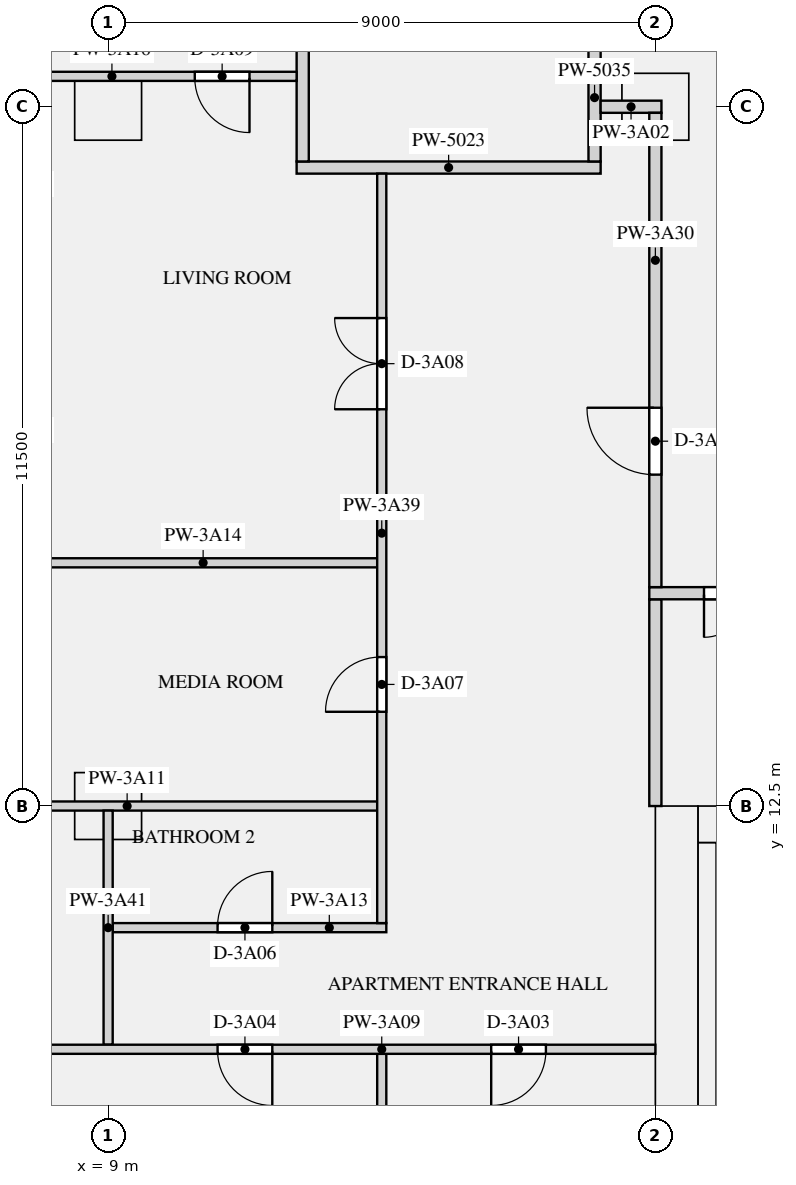
"""IFC4 building model, lengths in metres.
Left out: names, types, materials, properties, quantities, classifications, styles, units other than length and angle.
Written with IfcOpenShell. Run it as: python <this file> out.ifc"""

import sys

from ifc_helpers import new_model, si_unit, direction, frame, frame_2d, origin, origin_2d, place, context, subcontext, project, spatial, rectangle, extrude, element, fill, save


model = new_model("IFC4")
c1 = context("Model", 3, precision=1e-05, world=origin(), true_north=direction((0.0, 1.0)))
c2 = subcontext(c1, "Body", "Model", "MODEL_VIEW")
j1 = project(units=[si_unit("LENGTHUNIT", "METRE"), si_unit("PLANEANGLEUNIT", "RADIAN")], contexts=[c1])
p1 = place(None, origin())
s1 = spatial("IfcSite", under=j1, at=p1, CompositionType="ELEMENT")
p2 = place(p1, origin())
s2 = spatial("IfcBuilding", under=s1, at=p2, CompositionType="ELEMENT")
p3 = place(p2, frame((0.0, 0.0, 144.45)))
s3 = spatial("IfcBuildingStorey", under=s2, at=p3, CompositionType="ELEMENT", Elevation=144.45)
for number, where, z_axis, x_axis in (
    (1, (9.0, 24.0, 0.0), (0.0, 0.0, 1.0), (1.0, 0.0, 0.0)),
    (2, (18.0, 24.0, 0.0), (0.0, 0.0, 1.0), (1.0, 0.0, 0.0)),
    (3, (9.0, 12.5, 0.0), (0.0, 0.0, 1.0), (1.0, 0.0, 0.0)),
):
    element("IfcColumn", number, at=place(p3, frame(where, z_axis=z_axis, x_axis=x_axis)), inside=s3, PredefinedType="COLUMN", context=c2, shape_type="SweptSolid", body=[
        extrude(rectangle(XDim=1.1, YDim=1.1, at=origin_2d()), origin(), (0.0, 0.0, 1.0), 3.15),
    ])
p4 = place(p3, frame((18.35, 0.0, 0.0), z_axis=(0.0, 0.0, 1.0), x_axis=(0.0, 1.0, 0.0)))
e4 = element("IfcWall", 4, at=p4, inside=s3, PredefinedType="SHEAR", context=c2, shape_type="SweptSolid", body=[
    extrude(rectangle(XDim=12.5, YDim=0.7, at=frame_2d((6.25, 0.0))), origin(), (0.0, 0.0, 1.0), 3.15),
])
p5 = place(p3, frame((18.7, 12.2, 0.0), z_axis=(0.0, 0.0, 1.0), x_axis=(1.0, 0.0, 0.0)))
e5 = element("IfcWall", 5, at=p5, inside=s3, PredefinedType="SHEAR", context=c2, shape_type="SweptSolid", body=[
    extrude(rectangle(XDim=34.6, YDim=0.6, at=frame_2d((17.3, 0.0))), origin(), (0.0, 0.0, 1.0), 3.15),
])
p6 = place(p5, frame((24.475, 0.0, 0.0)))
e6 = element("IfcOpeningElement", 6, at=p6, cuts=e5, PredefinedType="OPENING", context=c2, shape_type="SweptSolid", body=[
    extrude(rectangle(XDim=1.1, YDim=2.1, at=frame_2d((0.55, 1.05))), frame((0.0, 0.31, 0.0), z_axis=(0.0, -1.0, 0.0), x_axis=(1.0, 0.0, 0.0)), (0.0, 0.0, 1.0), 0.62),
])
p7 = place(p5, frame((26.725, 0.0, 0.0)))
e7 = element("IfcOpeningElement", 7, at=p7, cuts=e5, PredefinedType="OPENING", context=c2, shape_type="SweptSolid", body=[
    extrude(rectangle(XDim=1.1, YDim=2.1, at=frame_2d((0.55, 1.05))), frame((0.0, 0.31, 0.0), z_axis=(0.0, -1.0, 0.0), x_axis=(1.0, 0.0, 0.0)), (0.0, 0.0, 1.0), 0.62),
])
p8 = place(p5, frame((28.975, 0.0, 0.0)))
e8 = element("IfcOpeningElement", 8, at=p8, cuts=e5, PredefinedType="OPENING", context=c2, shape_type="SweptSolid", body=[
    extrude(rectangle(XDim=1.1, YDim=2.1, at=frame_2d((0.55, 1.05))), frame((0.0, 0.31, 0.0), z_axis=(0.0, -1.0, 0.0), x_axis=(1.0, 0.0, 0.0)), (0.0, 0.0, 1.0), 0.62),
])
p9 = place(p5, frame((14.35, 0.0, 0.0)))
e9 = element("IfcOpeningElement", 9, at=p9, cuts=e5, PredefinedType="OPENING", context=c2, shape_type="SweptSolid", body=[
    extrude(rectangle(XDim=0.9, YDim=2.1, at=frame_2d((0.45, 1.05))), frame((0.0, 0.31, 0.0), z_axis=(0.0, -1.0, 0.0), x_axis=(1.0, 0.0, 0.0)), (0.0, 0.0, 1.0), 0.62),
])
p10 = place(p5, frame((1.45, 0.0, 0.0)))
e10 = element("IfcOpeningElement", 10, at=p10, cuts=e5, PredefinedType="OPENING", context=c2, shape_type="SweptSolid", body=[
    extrude(rectangle(XDim=1.2, YDim=2.1, at=frame_2d((0.6, 1.05))), frame((0.0, 0.31, 0.0), z_axis=(0.0, -1.0, 0.0), x_axis=(1.0, 0.0, 0.0)), (0.0, 0.0, 1.0), 0.62),
])
p11 = place(p5, frame((31.95, 0.0, 0.0)))
e11 = element("IfcOpeningElement", 11, at=p11, cuts=e5, PredefinedType="OPENING", context=c2, shape_type="SweptSolid", body=[
    extrude(rectangle(XDim=1.2, YDim=2.1, at=frame_2d((0.6, 1.05))), frame((0.0, 0.31, 0.0), z_axis=(0.0, -1.0, 0.0), x_axis=(1.0, 0.0, 0.0)), (0.0, 0.0, 1.0), 0.62),
])
p12 = place(p3, frame((18.85, 1.0, 0.0), z_axis=(0.0, 0.0, 1.0), x_axis=(0.0, 1.0, 0.0)))
e12 = element("IfcWall", 12, at=p12, inside=s3, PredefinedType="SHEAR", context=c2, shape_type="SweptSolid", body=[
    extrude(rectangle(XDim=10.9, YDim=0.3, at=frame_2d((5.45, 0.0))), origin(), (0.0, 0.0, 1.0), 3.15),
])
p13 = place(p3, frame((12.1, 23.0, 0.0), z_axis=(0.0, 0.0, 1.0), x_axis=(1.0, 0.0, 0.0)))
e13 = element("IfcWall", 13, at=p13, inside=s3, PredefinedType="PARTITIONING", context=c2, shape_type="SweptSolid", body=[
    extrude(rectangle(XDim=5.0, YDim=0.2, at=frame_2d((2.5, 0.0))), origin(), (0.0, 0.0, 1.0), 2.83),
])
p14 = place(p3, frame((18.0, 12.5, 0.0), z_axis=(0.0, 0.0, 1.0), x_axis=(0.0, 1.0, 0.0)))
e14 = element("IfcWall", 14, at=p14, inside=s3, PredefinedType="PARTITIONING", context=c2, shape_type="SweptSolid", body=[
    extrude(rectangle(XDim=3.4, YDim=0.2, at=frame_2d((1.7, 0.0))), origin(), (0.0, 0.0, 1.0), 2.83),
])
p15 = place(p3, frame((12.2, 23.1, 0.0), z_axis=(0.0, 0.0, 1.0), x_axis=(0.0, 1.0, 0.0)))
e15 = element("IfcWall", 15, at=p15, inside=s3, PredefinedType="PARTITIONING", context=c2, shape_type="SweptSolid", body=[
    extrude(rectangle(XDim=3.9, YDim=0.2, at=frame_2d((1.95, 0.0))), origin(), (0.0, 0.0, 1.0), 2.83),
])
p16 = place(p3, frame((17.0, 23.1, 0.0), z_axis=(0.0, 0.0, 1.0), x_axis=(0.0, 1.0, 0.0)))
e16 = element("IfcWall", 16, at=p16, inside=s3, PredefinedType="PARTITIONING", context=c2, shape_type="SweptSolid", body=[
    extrude(rectangle(XDim=3.8, YDim=0.2, at=frame_2d((1.9, 0.0))), origin(), (0.0, 0.0, 1.0), 2.83),
])
p17 = place(p16, frame((2.1, 0.0, 0.0)))
e17 = element("IfcOpeningElement", 17, at=p17, cuts=e16, PredefinedType="OPENING", context=c2, shape_type="SweptSolid", body=[
    extrude(rectangle(XDim=1.2, YDim=2.1, at=frame_2d((0.6, 1.05))), frame((0.0, 0.11, 0.0), z_axis=(0.0, -1.0, 0.0), x_axis=(1.0, 0.0, 0.0)), (0.0, 0.0, 1.0), 0.22),
])
p18 = place(p3, frame((17.1, 24.0, 0.0), z_axis=(0.0, 0.0, 1.0), x_axis=(1.0, 0.0, 0.0)))
e18 = element("IfcWall", 18, at=p18, inside=s3, PredefinedType="PARTITIONING", context=c2, shape_type="SweptSolid", body=[
    extrude(rectangle(XDim=1.0, YDim=0.2, at=frame_2d((0.5, 0.0))), origin(), (0.0, 0.0, 1.0), 2.83),
])
p19 = place(p3, frame((5.2, 8.5, 0.0), z_axis=(0.0, 0.0, 1.0), x_axis=(1.0, 0.0, 0.0)))
e19 = element("IfcWall", 19, at=p19, inside=s3, PredefinedType="PARTITIONING", context=c2, shape_type="SweptSolid", body=[
    extrude(rectangle(XDim=12.8, YDim=0.15, at=frame_2d((6.4, 0.0))), origin(), (0.0, 0.0, 1.0), 2.83),
])
p20 = place(p19, frame((10.1, 0.0, 0.0)))
e20 = element("IfcOpeningElement", 20, at=p20, cuts=e19, PredefinedType="OPENING", context=c2, shape_type="SweptSolid", body=[
    extrude(rectangle(XDim=0.9, YDim=2.1, at=frame_2d((0.45, 1.05))), frame((0.0, 0.085, 0.0), z_axis=(0.0, -1.0, 0.0), x_axis=(1.0, 0.0, 0.0)), (0.0, 0.0, 1.0), 0.17),
])
p21 = place(p19, frame((5.6, 0.0, 0.0)))
e21 = element("IfcOpeningElement", 21, at=p21, cuts=e19, PredefinedType="OPENING", context=c2, shape_type="SweptSolid", body=[
    extrude(rectangle(XDim=0.9, YDim=2.1, at=frame_2d((0.45, 1.05))), frame((0.0, 0.085, 0.0), z_axis=(0.0, -1.0, 0.0), x_axis=(1.0, 0.0, 0.0)), (0.0, 0.0, 1.0), 0.17),
])
p22 = place(p19, frame((1.375, 0.0, 0.0)))
e22 = element("IfcOpeningElement", 22, at=p22, cuts=e19, PredefinedType="OPENING", context=c2, shape_type="SweptSolid", body=[
    extrude(rectangle(XDim=0.9, YDim=2.1, at=frame_2d((0.45, 1.05))), frame((0.0, 0.085, 0.0), z_axis=(0.0, -1.0, 0.0), x_axis=(1.0, 0.0, 0.0)), (0.0, 0.0, 1.0), 0.17),
])
p23 = place(p3, frame((5.2, 12.5, 0.0), z_axis=(0.0, 0.0, 1.0), x_axis=(1.0, 0.0, 0.0)))
e23 = element("IfcWall", 23, at=p23, inside=s3, PredefinedType="PARTITIONING", context=c2, shape_type="SweptSolid", body=[
    extrude(rectangle(XDim=8.225, YDim=0.15, at=frame_2d((4.113, 0.0))), origin(), (0.0, 0.0, 1.0), 2.83),
])
p24 = place(p3, frame((9.075, 10.5, 0.0), z_axis=(0.0, 0.0, 1.0), x_axis=(1.0, 0.0, 0.0)))
e24 = element("IfcWall", 24, at=p24, inside=s3, PredefinedType="PARTITIONING", context=c2, shape_type="SweptSolid", body=[
    extrude(rectangle(XDim=4.5, YDim=0.15, at=frame_2d((2.25, 0.0))), origin(), (0.0, 0.0, 1.0), 2.83),
])
p25 = place(p24, frame((1.725, 0.0, 0.0)))
e25 = element("IfcOpeningElement", 25, at=p25, cuts=e24, PredefinedType="OPENING", context=c2, shape_type="SweptSolid", body=[
    extrude(rectangle(XDim=0.9, YDim=2.1, at=frame_2d((0.45, 1.05))), frame((0.0, 0.085, 0.0), z_axis=(0.0, -1.0, 0.0), x_axis=(1.0, 0.0, 0.0)), (0.0, 0.0, 1.0), 0.17),
])
p26 = place(p3, frame((7.7, 16.5, 0.0), z_axis=(0.0, 0.0, 1.0), x_axis=(1.0, 0.0, 0.0)))
e26 = element("IfcWall", 26, at=p26, inside=s3, PredefinedType="PARTITIONING", context=c2, shape_type="SweptSolid", body=[
    extrude(rectangle(XDim=5.725, YDim=0.15, at=frame_2d((2.863, 0.0))), origin(), (0.0, 0.0, 1.0), 2.83),
])
p27 = place(p3, frame((7.7, 24.5, 0.0), z_axis=(0.0, 0.0, 1.0), x_axis=(1.0, 0.0, 0.0)))
e27 = element("IfcWall", 27, at=p27, inside=s3, PredefinedType="PARTITIONING", context=c2, shape_type="SweptSolid", body=[
    extrude(rectangle(XDim=4.4, YDim=0.15, at=frame_2d((2.2, 0.0))), origin(), (0.0, 0.0, 1.0), 2.83),
])
p28 = place(p27, frame((2.725, 0.0, 0.0)))
e28 = element("IfcOpeningElement", 28, at=p28, cuts=e27, PredefinedType="OPENING", context=c2, shape_type="SweptSolid", body=[
    extrude(rectangle(XDim=0.9, YDim=2.1, at=frame_2d((0.45, 1.05))), frame((0.0, 0.085, 0.0), z_axis=(0.0, -1.0, 0.0), x_axis=(1.0, 0.0, 0.0)), (0.0, 0.0, 1.0), 0.17),
])
p29 = place(p3, frame((17.9, 16.0, 0.0), z_axis=(0.0, 0.0, 1.0), x_axis=(1.0, 0.0, 0.0)))
e29 = element("IfcWall", 29, at=p29, inside=s3, PredefinedType="PARTITIONING", context=c2, shape_type="SweptSolid", body=[
    extrude(rectangle(XDim=36.2, YDim=0.2, at=frame_2d((18.1, 0.0))), origin(), (0.0, 0.0, 1.0), 2.83),
])
p30 = place(p29, frame((0.9, 0.0, 0.0)))
e30 = element("IfcOpeningElement", 30, at=p30, cuts=e29, PredefinedType="OPENING", context=c2, shape_type="SweptSolid", body=[
    extrude(rectangle(XDim=1.4, YDim=2.1, at=frame_2d((0.7, 1.05))), frame((0.0, 0.11, 0.0), z_axis=(0.0, -1.0, 0.0), x_axis=(1.0, 0.0, 0.0)), (0.0, 0.0, 1.0), 0.22),
])
p31 = place(p29, frame((33.9, 0.0, 0.0)))
e31 = element("IfcOpeningElement", 31, at=p31, cuts=e29, PredefinedType="OPENING", context=c2, shape_type="SweptSolid", body=[
    extrude(rectangle(XDim=1.4, YDim=2.1, at=frame_2d((0.7, 1.05))), frame((0.0, 0.11, 0.0), z_axis=(0.0, -1.0, 0.0), x_axis=(1.0, 0.0, 0.0)), (0.0, 0.0, 1.0), 0.22),
])
p32 = place(p3, frame((18.0, 16.1, 0.0), z_axis=(0.0, 0.0, 1.0), x_axis=(0.0, 1.0, 0.0)))
e32 = element("IfcWall", 32, at=p32, inside=s3, PredefinedType="PARTITIONING", context=c2, shape_type="SweptSolid", body=[
    extrude(rectangle(XDim=7.8, YDim=0.2, at=frame_2d((3.9, 0.0))), origin(), (0.0, 0.0, 1.0), 2.83),
])
p33 = place(p32, frame((1.85, 0.0, 0.0)))
e33 = element("IfcOpeningElement", 33, at=p33, cuts=e32, PredefinedType="OPENING", context=c2, shape_type="SweptSolid", body=[
    extrude(rectangle(XDim=1.1, YDim=2.1, at=frame_2d((0.55, 1.05))), frame((0.0, 0.11, 0.0), z_axis=(0.0, -1.0, 0.0), x_axis=(1.0, 0.0, 0.0)), (0.0, 0.0, 1.0), 0.22),
])
p34 = place(p3, frame((13.5, 0.7, 0.0), z_axis=(0.0, 0.0, 1.0), x_axis=(0.0, 1.0, 0.0)))
e34 = element("IfcWall", 34, at=p34, inside=s3, PredefinedType="PARTITIONING", context=c2, shape_type="SweptSolid", body=[
    extrude(rectangle(XDim=7.725, YDim=0.15, at=frame_2d((3.863, 0.0))), origin(), (0.0, 0.0, 1.0), 2.83),
])
p35 = place(p3, frame((13.5, 10.575, 0.0), z_axis=(0.0, 0.0, 1.0), x_axis=(0.0, 1.0, 0.0)))
e35 = element("IfcWall", 35, at=p35, inside=s3, PredefinedType="PARTITIONING", context=c2, shape_type="SweptSolid", body=[
    extrude(rectangle(XDim=12.325, YDim=0.15, at=frame_2d((6.163, 0.0))), origin(), (0.0, 0.0, 1.0), 2.83),
])
p36 = place(p35, frame((3.475, 0.0, 0.0)))
e36 = element("IfcOpeningElement", 36, at=p36, cuts=e35, PredefinedType="OPENING", context=c2, shape_type="SweptSolid", body=[
    extrude(rectangle(XDim=0.9, YDim=2.1, at=frame_2d((0.45, 1.05))), frame((0.0, 0.085, 0.0), z_axis=(0.0, -1.0, 0.0), x_axis=(1.0, 0.0, 0.0)), (0.0, 0.0, 1.0), 0.17),
])
p37 = place(p35, frame((8.45, 0.0, 0.0)))
e37 = element("IfcOpeningElement", 37, at=p37, cuts=e35, PredefinedType="OPENING", context=c2, shape_type="SweptSolid", body=[
    extrude(rectangle(XDim=1.5, YDim=2.1, at=frame_2d((0.75, 1.05))), frame((0.0, 0.085, 0.0), z_axis=(0.0, -1.0, 0.0), x_axis=(1.0, 0.0, 0.0)), (0.0, 0.0, 1.0), 0.17),
])
p38 = place(p3, frame((9.0, 8.575, 0.0), z_axis=(0.0, 0.0, 1.0), x_axis=(0.0, 1.0, 0.0)))
e38 = element("IfcWall", 38, at=p38, inside=s3, PredefinedType="PARTITIONING", context=c2, shape_type="SweptSolid", body=[
    extrude(rectangle(XDim=3.85, YDim=0.15, at=frame_2d((1.925, 0.0))), origin(), (0.0, 0.0, 1.0), 2.83),
])
p39 = place(p30, frame((1.4, 0.0, 0.0), z_axis=(0.0, 0.0, 1.0), x_axis=(-1.0, 0.0, 0.0)))
e39 = element("IfcDoor", 39, at=p39, inside=s3, OperationType="DOUBLE_DOOR_SINGLE_SWING", PredefinedType="DOOR", context=c2, shape_type="SweptSolid", body=[
    extrude(rectangle(XDim=1.4, YDim=2.1, at=frame_2d((0.7, 1.05))), frame((0.0, 0.025, 0.0), z_axis=(0.0, -1.0, 0.0), x_axis=(1.0, 0.0, 0.0)), (0.0, 0.0, 1.0), 0.05),
])
fill(e30, e39)
p40 = place(p20, frame((0.9, 0.0, 0.0), z_axis=(0.0, 0.0, 1.0), x_axis=(-1.0, 0.0, 0.0)))
e40 = element("IfcDoor", 40, at=p40, inside=s3, OperationType="SINGLE_SWING_RIGHT", PredefinedType="DOOR", context=c2, shape_type="SweptSolid", body=[
    extrude(rectangle(XDim=0.9, YDim=2.1, at=frame_2d((0.45, 1.05))), frame((0.0, 0.025, 0.0), z_axis=(0.0, -1.0, 0.0), x_axis=(1.0, 0.0, 0.0)), (0.0, 0.0, 1.0), 0.05),
])
fill(e20, e40)
p41 = place(p21, frame((0.9, 0.0, 0.0), z_axis=(0.0, 0.0, 1.0), x_axis=(-1.0, 0.0, 0.0)))
e41 = element("IfcDoor", 41, at=p41, inside=s3, OperationType="SINGLE_SWING_LEFT", PredefinedType="DOOR", context=c2, shape_type="SweptSolid", body=[
    extrude(rectangle(XDim=0.9, YDim=2.1, at=frame_2d((0.45, 1.05))), frame((0.0, 0.025, 0.0), z_axis=(0.0, -1.0, 0.0), x_axis=(1.0, 0.0, 0.0)), (0.0, 0.0, 1.0), 0.05),
])
fill(e21, e41)
p42 = place(p25, origin())
e42 = element("IfcDoor", 42, at=p42, inside=s3, OperationType="SINGLE_SWING_RIGHT", PredefinedType="DOOR", context=c2, shape_type="SweptSolid", body=[
    extrude(rectangle(XDim=0.9, YDim=2.1, at=frame_2d((0.45, 1.05))), frame((0.0, 0.025, 0.0), z_axis=(0.0, -1.0, 0.0), x_axis=(1.0, 0.0, 0.0)), (0.0, 0.0, 1.0), 0.05),
])
fill(e25, e42)
p43 = place(p36, origin())
e43 = element("IfcDoor", 43, at=p43, inside=s3, OperationType="SINGLE_SWING_LEFT", PredefinedType="DOOR", context=c2, shape_type="SweptSolid", body=[
    extrude(rectangle(XDim=0.9, YDim=2.1, at=frame_2d((0.45, 1.05))), frame((0.0, 0.025, 0.0), z_axis=(0.0, -1.0, 0.0), x_axis=(1.0, 0.0, 0.0)), (0.0, 0.0, 1.0), 0.05),
])
fill(e36, e43)
p44 = place(p37, origin())
e44 = element("IfcDoor", 44, at=p44, inside=s3, OperationType="DOUBLE_DOOR_SINGLE_SWING", PredefinedType="DOOR", context=c2, shape_type="SweptSolid", body=[
    extrude(rectangle(XDim=1.5, YDim=2.1, at=frame_2d((0.75, 1.05))), frame((0.0, 0.025, 0.0), z_axis=(0.0, -1.0, 0.0), x_axis=(1.0, 0.0, 0.0)), (0.0, 0.0, 1.0), 0.05),
])
fill(e37, e44)
p45 = place(p28, frame((0.9, 0.0, 0.0), z_axis=(0.0, 0.0, 1.0), x_axis=(-1.0, 0.0, 0.0)))
e45 = element("IfcDoor", 45, at=p45, inside=s3, OperationType="SINGLE_SWING_LEFT", PredefinedType="DOOR", context=c2, shape_type="SweptSolid", body=[
    extrude(rectangle(XDim=0.9, YDim=2.1, at=frame_2d((0.45, 1.05))), frame((0.0, 0.025, 0.0), z_axis=(0.0, -1.0, 0.0), x_axis=(1.0, 0.0, 0.0)), (0.0, 0.0, 1.0), 0.05),
])
fill(e28, e45)
p46 = place(p33, origin())
e46 = element("IfcDoor", 46, at=p46, inside=s3, OperationType="SINGLE_SWING_RIGHT", PredefinedType="DOOR", context=c2, shape_type="SweptSolid", body=[
    extrude(rectangle(XDim=1.1, YDim=2.1, at=frame_2d((0.55, 1.05))), frame((0.0, 0.025, 0.0), z_axis=(0.0, -1.0, 0.0), x_axis=(1.0, 0.0, 0.0)), (0.0, 0.0, 1.0), 0.05),
])
fill(e33, e46)
save(model, sys.argv[1])
